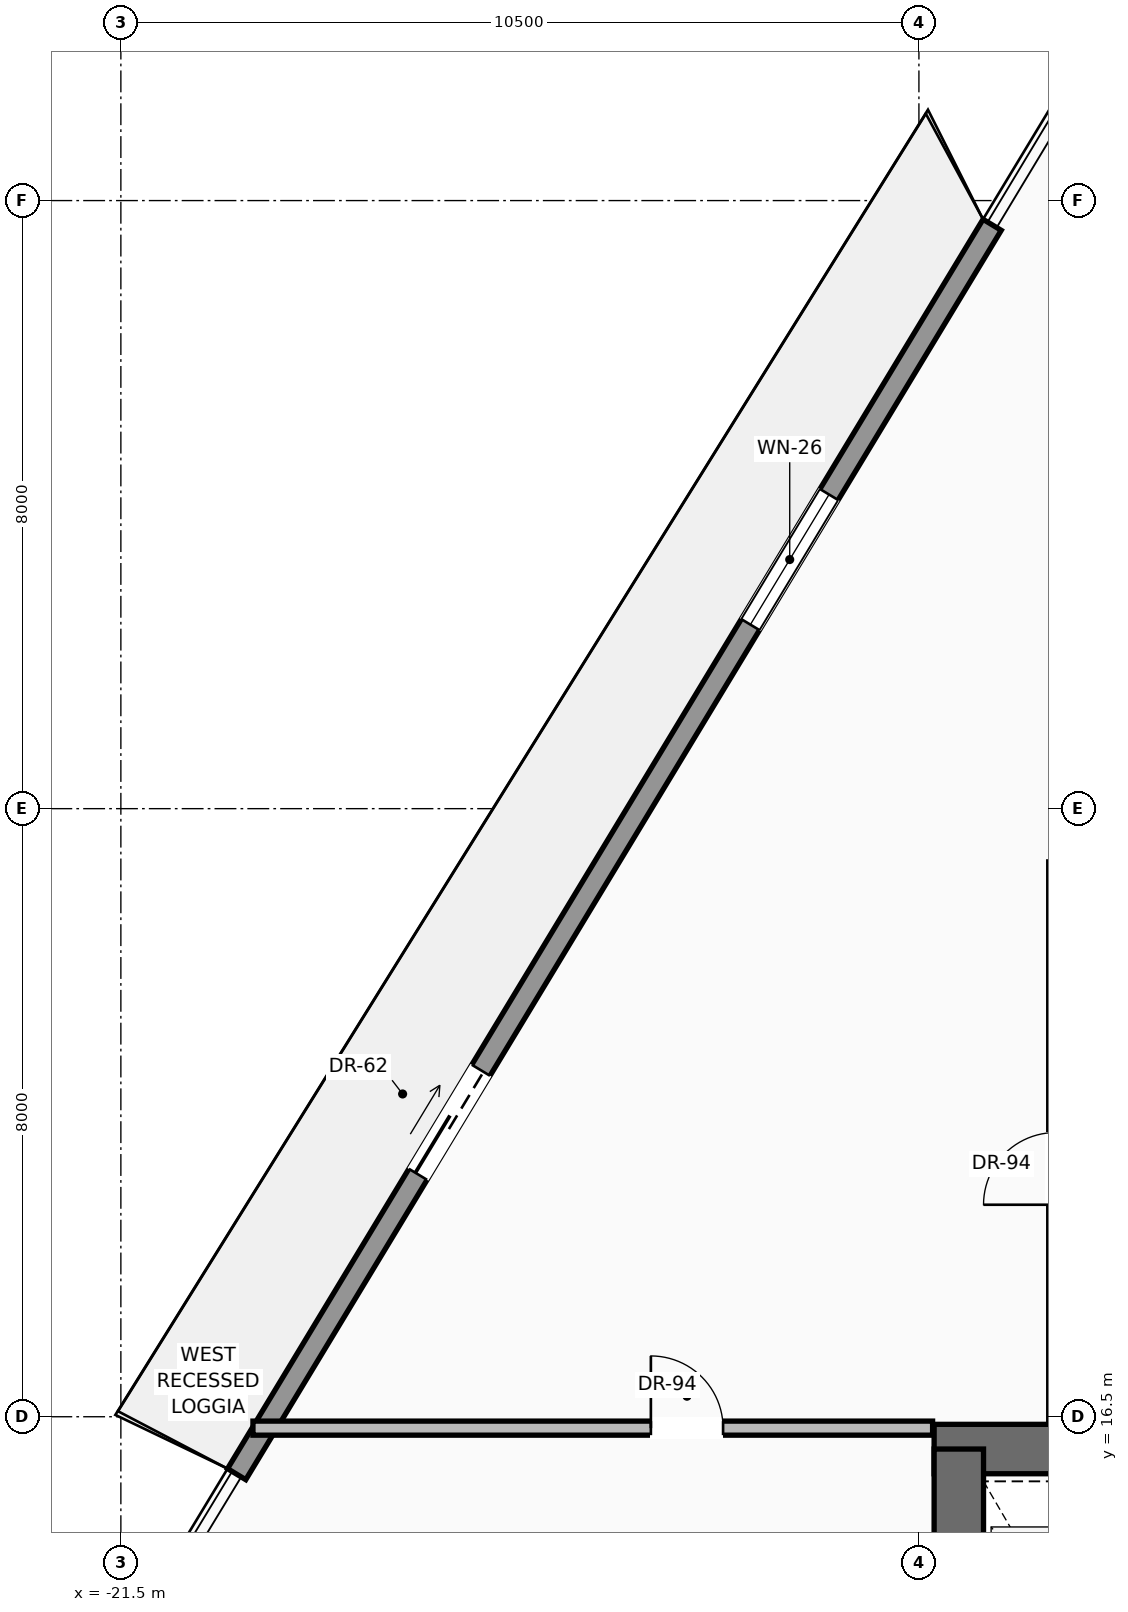
"""IFC4 building model, lengths in metres.
Left out: names, types, materials, properties, quantities, classifications, styles, units other than length and angle.
Written with IfcOpenShell. Run it as: python <this file> out.ifc"""

import sys

from ifc_helpers import new_model, si_unit, direction, frame, frame_2d, origin, place, context, subcontext, project, spatial, rectangle, extrude, source, transform, mapped, element, fill, save


model = new_model("IFC4")
c1 = context("Model", 3, precision=1e-05, world=origin(), true_north=direction((0.0, 1.0)))
c2 = subcontext(c1, "Body", "Model", "MODEL_VIEW")
j1 = project(units=[si_unit("LENGTHUNIT", "METRE"), si_unit("PLANEANGLEUNIT", "RADIAN")], contexts=[c1])
p1 = place(None, origin())
s1 = spatial("IfcSite", under=j1, at=p1, CompositionType="ELEMENT")
p2 = place(p1, origin())
s2 = spatial("IfcBuilding", under=s1, at=p2, CompositionType="ELEMENT")
p3 = place(p2, frame((0.0, 0.0, 211.7)))
s3 = spatial("IfcBuildingStorey", under=s2, at=p3, CompositionType="ELEMENT", Elevation=211.7)
p4 = place(p3, frame((-10.8, 16.075, 0.0), z_axis=(0.0, 0.0, 1.0), x_axis=(1.0, 0.0, 0.0)))
e1 = element("IfcWall", 1, at=p4, inside=s3, PredefinedType="SHEAR", context=c2, shape_type="SweptSolid", body=[
    extrude(rectangle(XDim=21.6, YDim=0.65, at=frame_2d((10.8, 0.0))), origin(), (0.0, 0.0, 1.0), 3.42),
])
p5 = place(p4, frame((3.37, 0.0, 0.0)))
e2 = element("IfcOpeningElement", 2, at=p5, cuts=e1, PredefinedType="OPENING", context=c2, shape_type="SweptSolid", body=[
    extrude(rectangle(XDim=1.3, YDim=2.3, at=frame_2d((0.65, 1.15))), frame((0.0, 0.335, 0.0), z_axis=(0.0, -1.0, 0.0), x_axis=(1.0, 0.0, 0.0)), (0.0, 0.0, 1.0), 0.67),
])
p6 = place(p4, frame((9.8, 0.0, 0.0)))
e3 = element("IfcOpeningElement", 3, at=p6, cuts=e1, PredefinedType="OPENING", context=c2, shape_type="SweptSolid", body=[
    extrude(rectangle(XDim=2.0, YDim=2.4, at=frame_2d((1.0, 1.2))), frame((0.0, 0.335, 0.0), z_axis=(0.0, -1.0, 0.0), x_axis=(1.0, 0.0, 0.0)), (0.0, 0.0, 1.0), 0.67),
])
p7 = place(p3, frame((-10.475, 0.525, 0.0), z_axis=(0.0, 0.0, 1.0), x_axis=(0.0, 1.0, 0.0)))
e4 = element("IfcWall", 4, at=p7, inside=s3, PredefinedType="SHEAR", context=c2, shape_type="SweptSolid", body=[
    extrude(rectangle(XDim=15.55, YDim=0.65, at=frame_2d((7.775, 0.0))), origin(), (0.0, 0.0, 1.0), 3.42),
])
p8 = place(p3, frame((-19.976, 15.744, 0.0), z_axis=(0.0, 0.0, 1.0), x_axis=(0.517464575924, 0.855704629334, 0.0)))
e5 = element("IfcWall", 5, at=p8, inside=s3, PredefinedType="SOLIDWALL", context=c2, shape_type="SweptSolid", body=[
    extrude(rectangle(XDim=19.208, YDim=0.28, at=frame_2d((9.604, 0.0))), origin(), (0.0, 0.0, 1.0), 3.0),
])
p9 = place(p8, frame((4.61, 0.0, 0.0)))
e6 = element("IfcOpeningElement", 6, at=p9, cuts=e5, PredefinedType="OPENING", context=c2, shape_type="SweptSolid", body=[
    extrude(rectangle(XDim=1.6, YDim=2.35, at=frame_2d((0.8, 1.175))), frame((0.0, 0.15, 0.0), z_axis=(0.0, -1.0, 0.0), x_axis=(1.0, 0.0, 0.0)), (0.0, 0.0, 1.0), 0.3),
])
p10 = place(p8, frame((13.062, 0.0, 0.9)))
e7 = element("IfcOpeningElement", 7, at=p10, cuts=e5, PredefinedType="OPENING", context=c2, shape_type="SweptSolid", body=[
    extrude(rectangle(XDim=2.0, YDim=1.85, at=frame_2d((1.0, 0.925))), frame((0.0, 0.15, 0.0), z_axis=(0.0, -1.0, 0.0), x_axis=(1.0, 0.0, 0.0)), (0.0, 0.0, 1.0), 0.3),
])
p11 = place(p3, frame((-19.762, 16.35, 0.0), z_axis=(0.0, 0.0, 1.0), x_axis=(1.0, 0.0, 0.0)))
e8 = element("IfcWall", 8, at=p11, inside=s3, PredefinedType="PARTITIONING", context=c2, shape_type="SweptSolid", body=[
    extrude(rectangle(XDim=8.942, YDim=0.185, at=frame_2d((4.471, 0.0))), origin(), (0.0, 0.0, 1.0), 3.412),
])
p12 = place(p11, frame((5.235, 0.0, 0.0)))
e9 = element("IfcOpeningElement", 9, at=p12, cuts=e8, PredefinedType="OPENING", context=c2, shape_type="SweptSolid", body=[
    extrude(rectangle(XDim=0.95, YDim=2.2, at=frame_2d((0.475, 1.1))), frame((0.0, 0.103, 0.0), z_axis=(0.0, -1.0, 0.0), x_axis=(1.0, 0.0, 0.0)), (0.0, 0.0, 1.0), 0.205),
])
m1 = source(origin(), c2, "Body", "SweptSolid", [
    extrude(rectangle(XDim=1.6, YDim=2.35, at=frame_2d((0.8, 1.175))), frame((0.0, 0.025, 0.0), z_axis=(0.0, -1.0, 0.0), x_axis=(1.0, 0.0, 0.0)), (0.0, 0.0, 1.0), 0.05),
])
p13 = place(p9, origin())
e10 = element("IfcDoor", 10, at=p13, inside=s3, OperationType="SLIDING_TO_LEFT", PredefinedType="DOOR", context=c2, shape_type="MappedRepresentation", body=[
    mapped(m1, transform((0.0, 0.0, 0.0), scale=1.0)),
])
fill(e6, e10)
m2 = source(origin(), c2, "Body", "SweptSolid", [
    extrude(rectangle(XDim=2.0, YDim=1.85, at=frame_2d((1.0, 0.925))), frame((0.0, 0.03, 0.0), z_axis=(0.0, -1.0, 0.0), x_axis=(1.0, 0.0, 0.0)), (0.0, 0.0, 1.0), 0.06),
])
p14 = place(p10, origin())
e11 = element("IfcWindow", 11, at=p14, inside=s3, PartitioningType="SINGLE_PANEL", PredefinedType="WINDOW", context=c2, shape_type="MappedRepresentation", body=[
    mapped(m2, transform((0.0, 0.0, 0.0), scale=1.0)),
])
fill(e7, e11)
m3 = source(origin(), c2, "Body", "SweptSolid", [
    extrude(rectangle(XDim=0.95, YDim=2.2, at=frame_2d((0.475, 1.1))), frame((0.0, 0.025, 0.0), z_axis=(0.0, -1.0, 0.0), x_axis=(1.0, 0.0, 0.0)), (0.0, 0.0, 1.0), 0.05),
])
p15 = place(p12, origin())
e12 = element("IfcDoor", 12, at=p15, inside=s3, OperationType="SINGLE_SWING_LEFT", PredefinedType="DOOR", context=c2, shape_type="MappedRepresentation", body=[
    mapped(m3, transform((0.0, 0.0, 0.0), scale=1.0)),
])
fill(e9, e12)
save(model, sys.argv[1])
